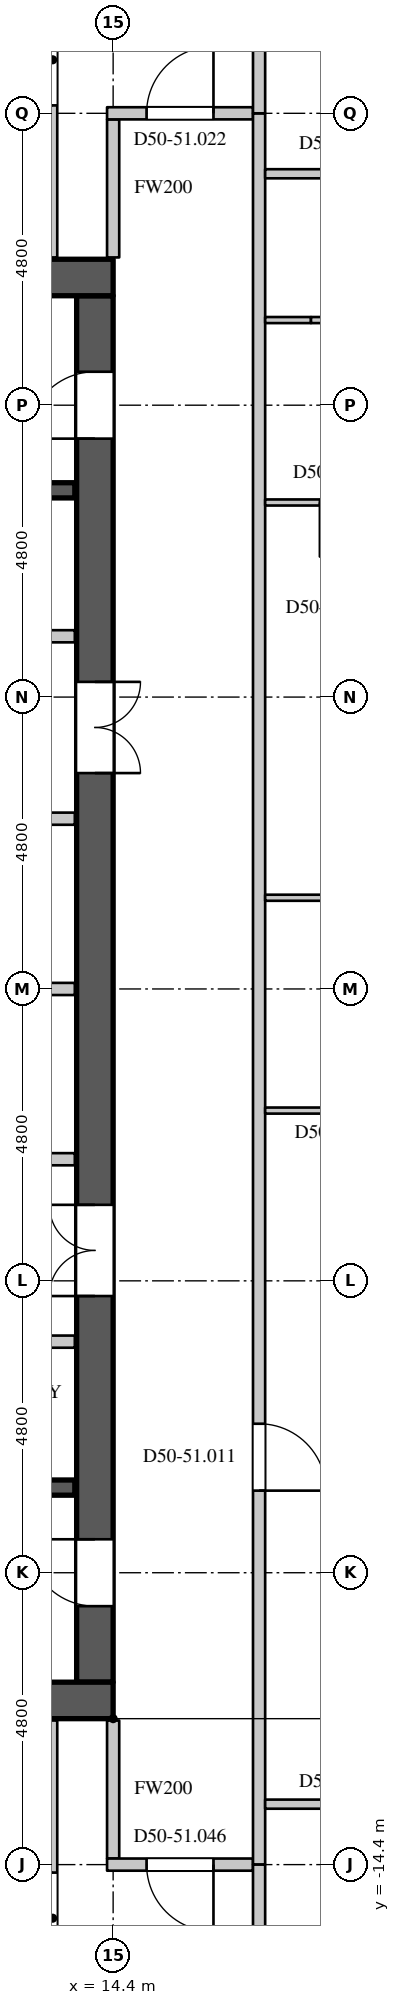
"""IFC4 building model, lengths in metres.
Left out: names, types, materials, properties, quantities, classifications, styles, units other than length and angle.
Written with IfcOpenShell. Run it as: python <this file> out.ifc"""

import sys

from ifc_helpers import new_model, si_unit, direction, frame, frame_2d, origin, place, context, subcontext, project, spatial, rectangle, extrude, element, fill, save


model = new_model("IFC4")
c1 = context("Model", 3, precision=1e-05, world=origin(), true_north=direction((0.0, 1.0)))
c2 = subcontext(c1, "Body", "Model", "MODEL_VIEW")
j1 = project(units=[si_unit("LENGTHUNIT", "METRE"), si_unit("PLANEANGLEUNIT", "RADIAN")], contexts=[c1])
p1 = place(None, origin())
s1 = spatial("IfcSite", under=j1, at=p1, CompositionType="ELEMENT")
p2 = place(p1, origin())
s2 = spatial("IfcBuilding", under=s1, at=p2, CompositionType="ELEMENT")
p3 = place(p2, frame((0.0, 0.0, 218.1)))
s3 = spatial("IfcBuildingStorey", under=s2, at=p3, CompositionType="ELEMENT", Elevation=218.1)
for number, where, z_axis, x_axis in (
    (1, (-14.4, 11.7, 0.0), (0.0, 0.0, 1.0), (1.0, 0.0, 0.0)),
    (2, (-14.4, -11.7, 0.0), (0.0, 0.0, 1.0), (1.0, 0.0, 0.0)),
):
    element("IfcWall", number, at=place(p3, frame(where, z_axis=z_axis, x_axis=x_axis)), inside=s3, PredefinedType="SHEAR", context=c2, shape_type="SweptSolid", body=[
        extrude(rectangle(XDim=28.8, YDim=0.6, at=frame_2d((14.4, 0.0))), origin(), (0.0, 0.0, 1.0), 4.2),
    ])
p4 = place(p3, frame((14.1, -11.4, 0.0), z_axis=(0.0, 0.0, 1.0), x_axis=(0.0, 1.0, 0.0)))
e3 = element("IfcWall", 3, at=p4, inside=s3, PredefinedType="SHEAR", context=c2, shape_type="SweptSolid", body=[
    extrude(rectangle(XDim=22.8, YDim=0.6, at=frame_2d((11.4, 0.0))), origin(), (0.0, 0.0, 1.0), 4.2),
])
p5 = place(p4, frame((20.45, 0.0, 0.0)))
e4 = element("IfcOpeningElement", 4, at=p5, cuts=e3, PredefinedType="OPENING", context=c2, shape_type="SweptSolid", body=[
    extrude(rectangle(XDim=1.1, YDim=2.2, at=frame_2d((0.55, 1.1))), frame((0.0, 0.31, 0.0), z_axis=(0.0, -1.0, 0.0), x_axis=(1.0, 0.0, 0.0)), (0.0, 0.0, 1.0), 0.62),
])
p6 = place(p4, frame((1.25, 0.0, 0.0)))
e5 = element("IfcOpeningElement", 5, at=p6, cuts=e3, PredefinedType="OPENING", context=c2, shape_type="SweptSolid", body=[
    extrude(rectangle(XDim=1.1, YDim=2.2, at=frame_2d((0.55, 1.1))), frame((0.0, 0.31, 0.0), z_axis=(0.0, -1.0, 0.0), x_axis=(1.0, 0.0, 0.0)), (0.0, 0.0, 1.0), 0.62),
])
p7 = place(p4, frame((14.95, 0.0, 0.0)))
e6 = element("IfcOpeningElement", 6, at=p7, cuts=e3, PredefinedType="OPENING", context=c2, shape_type="SweptSolid", body=[
    extrude(rectangle(XDim=1.5, YDim=2.4, at=frame_2d((0.75, 1.2))), frame((0.0, 0.31, 0.0), z_axis=(0.0, -1.0, 0.0), x_axis=(1.0, 0.0, 0.0)), (0.0, 0.0, 1.0), 0.62),
])
p8 = place(p4, frame((6.35, 0.0, 0.0)))
e7 = element("IfcOpeningElement", 7, at=p8, cuts=e3, PredefinedType="OPENING", context=c2, shape_type="SweptSolid", body=[
    extrude(rectangle(XDim=1.5, YDim=2.4, at=frame_2d((0.75, 1.2))), frame((0.0, 0.31, 0.0), z_axis=(0.0, -1.0, 0.0), x_axis=(1.0, 0.0, 0.0)), (0.0, 0.0, 1.0), 0.62),
])
p9 = place(p3, frame((-7.7, -5.8, 0.0), z_axis=(0.0, 0.0, 1.0), x_axis=(1.0, 0.0, 0.0)))
e8 = element("IfcWall", 8, at=p9, inside=s3, PredefinedType="PARTITIONING", context=c2, shape_type="SweptSolid", body=[
    extrude(rectangle(XDim=21.47, YDim=0.2, at=frame_2d((10.735, 0.0))), origin(), (0.0, 0.0, 1.0), 3.95),
])
p10 = place(p9, frame((1.75, 0.0, 0.0)))
e9 = element("IfcOpeningElement", 9, at=p10, cuts=e8, PredefinedType="OPENING", context=c2, shape_type="SweptSolid", body=[
    extrude(rectangle(XDim=0.9, YDim=2.2, at=frame_2d((0.45, 1.1))), frame((0.0, 0.11, 0.0), z_axis=(0.0, -1.0, 0.0), x_axis=(1.0, 0.0, 0.0)), (0.0, 0.0, 1.0), 0.22),
])
p11 = place(p9, frame((5.95, 0.0, 0.0)))
e10 = element("IfcOpeningElement", 10, at=p11, cuts=e8, PredefinedType="OPENING", context=c2, shape_type="SweptSolid", body=[
    extrude(rectangle(XDim=0.9, YDim=2.2, at=frame_2d((0.45, 1.1))), frame((0.0, 0.11, 0.0), z_axis=(0.0, -1.0, 0.0), x_axis=(1.0, 0.0, 0.0)), (0.0, 0.0, 1.0), 0.22),
])
p12 = place(p9, frame((10.35, 0.0, 0.0)))
e11 = element("IfcOpeningElement", 11, at=p12, cuts=e8, PredefinedType="OPENING", context=c2, shape_type="SweptSolid", body=[
    extrude(rectangle(XDim=0.9, YDim=2.2, at=frame_2d((0.45, 1.1))), frame((0.0, 0.11, 0.0), z_axis=(0.0, -1.0, 0.0), x_axis=(1.0, 0.0, 0.0)), (0.0, 0.0, 1.0), 0.22),
])
p13 = place(p9, frame((14.65, 0.0, 0.0)))
e12 = element("IfcOpeningElement", 12, at=p13, cuts=e8, PredefinedType="OPENING", context=c2, shape_type="SweptSolid", body=[
    extrude(rectangle(XDim=0.9, YDim=2.2, at=frame_2d((0.45, 1.1))), frame((0.0, 0.11, 0.0), z_axis=(0.0, -1.0, 0.0), x_axis=(1.0, 0.0, 0.0)), (0.0, 0.0, 1.0), 0.22),
])
p14 = place(p9, frame((18.75, 0.0, 0.0)))
e13 = element("IfcOpeningElement", 13, at=p14, cuts=e8, PredefinedType="OPENING", context=c2, shape_type="SweptSolid", body=[
    extrude(rectangle(XDim=0.9, YDim=2.2, at=frame_2d((0.45, 1.1))), frame((0.0, 0.11, 0.0), z_axis=(0.0, -1.0, 0.0), x_axis=(1.0, 0.0, 0.0)), (0.0, 0.0, 1.0), 0.22),
])
p15 = place(p3, frame((-7.7, 5.8, 0.0), z_axis=(0.0, 0.0, 1.0), x_axis=(1.0, 0.0, 0.0)))
e14 = element("IfcWall", 14, at=p15, inside=s3, PredefinedType="PARTITIONING", context=c2, shape_type="SweptSolid", body=[
    extrude(rectangle(XDim=21.47, YDim=0.2, at=frame_2d((10.735, 0.0))), origin(), (0.0, 0.0, 1.0), 3.95),
])
p16 = place(p15, frame((4.95, 0.0, 0.0)))
e15 = element("IfcOpeningElement", 15, at=p16, cuts=e14, PredefinedType="OPENING", context=c2, shape_type="SweptSolid", body=[
    extrude(rectangle(XDim=0.9, YDim=2.2, at=frame_2d((0.45, 1.1))), frame((0.0, 0.11, 0.0), z_axis=(0.0, -1.0, 0.0), x_axis=(1.0, 0.0, 0.0)), (0.0, 0.0, 1.0), 0.22),
])
p17 = place(p15, frame((15.55, 0.0, 0.0)))
e16 = element("IfcOpeningElement", 16, at=p17, cuts=e14, PredefinedType="OPENING", context=c2, shape_type="SweptSolid", body=[
    extrude(rectangle(XDim=0.9, YDim=2.2, at=frame_2d((0.45, 1.1))), frame((0.0, 0.11, 0.0), z_axis=(0.0, -1.0, 0.0), x_axis=(1.0, 0.0, 0.0)), (0.0, 0.0, 1.0), 0.22),
])
p18 = place(p3, frame((14.4, -14.3, 0.0), z_axis=(0.0, 0.0, 1.0), x_axis=(0.0, 1.0, 0.0)))
e17 = element("IfcWall", 17, at=p18, inside=s3, PredefinedType="PARTITIONING", context=c2, shape_type="SweptSolid", body=[
    extrude(rectangle(XDim=2.27, YDim=0.2, at=frame_2d((1.135, 0.0))), origin(), (0.0, 0.0, 1.0), 3.95),
])
p19 = place(p3, frame((14.3, -14.4, 0.0), z_axis=(0.0, 0.0, 1.0), x_axis=(1.0, 0.0, 0.0)))
e18 = element("IfcWall", 18, at=p19, inside=s3, PredefinedType="PARTITIONING", context=c2, shape_type="SweptSolid", body=[
    extrude(rectangle(XDim=2.4, YDim=0.2, at=frame_2d((1.2, 0.0))), origin(), (0.0, 0.0, 1.0), 3.95),
])
p20 = place(p19, frame((0.65, 0.0, 0.0)))
e19 = element("IfcOpeningElement", 19, at=p20, cuts=e18, PredefinedType="OPENING", context=c2, shape_type="SweptSolid", body=[
    extrude(rectangle(XDim=1.1, YDim=2.4, at=frame_2d((0.55, 1.2))), frame((0.0, 0.11, 0.0), z_axis=(0.0, -1.0, 0.0), x_axis=(1.0, 0.0, 0.0)), (0.0, 0.0, 1.0), 0.22),
])
p21 = place(p3, frame((14.4, 12.03, 0.0), z_axis=(0.0, 0.0, 1.0), x_axis=(0.0, 1.0, 0.0)))
e20 = element("IfcWall", 20, at=p21, inside=s3, PredefinedType="PARTITIONING", context=c2, shape_type="SweptSolid", body=[
    extrude(rectangle(XDim=2.27, YDim=0.2, at=frame_2d((1.135, 0.0))), origin(), (0.0, 0.0, 1.0), 3.95),
])
p22 = place(p3, frame((14.3, 14.4, 0.0), z_axis=(0.0, 0.0, 1.0), x_axis=(1.0, 0.0, 0.0)))
e21 = element("IfcWall", 21, at=p22, inside=s3, PredefinedType="PARTITIONING", context=c2, shape_type="SweptSolid", body=[
    extrude(rectangle(XDim=2.4, YDim=0.2, at=frame_2d((1.2, 0.0))), origin(), (0.0, 0.0, 1.0), 3.95),
])
p23 = place(p22, frame((0.65, 0.0, 0.0)))
e22 = element("IfcOpeningElement", 22, at=p23, cuts=e21, PredefinedType="OPENING", context=c2, shape_type="SweptSolid", body=[
    extrude(rectangle(XDim=1.1, YDim=2.4, at=frame_2d((0.55, 1.2))), frame((0.0, 0.11, 0.0), z_axis=(0.0, -1.0, 0.0), x_axis=(1.0, 0.0, 0.0)), (0.0, 0.0, 1.0), 0.22),
])
p24 = place(p3, frame((16.8, -14.4, 0.0), z_axis=(0.0, 0.0, 1.0), x_axis=(0.0, 1.0, 0.0)))
e23 = element("IfcWall", 23, at=p24, inside=s3, PredefinedType="PARTITIONING", context=c2, shape_type="SweptSolid", body=[
    extrude(rectangle(XDim=28.8, YDim=0.2, at=frame_2d((14.4, 0.0))), origin(), (0.0, 0.0, 1.0), 3.95),
])
p25 = place(p24, frame((6.15, 0.0, 0.0)))
e24 = element("IfcOpeningElement", 24, at=p25, cuts=e23, PredefinedType="OPENING", context=c2, shape_type="SweptSolid", body=[
    extrude(rectangle(XDim=1.1, YDim=2.4, at=frame_2d((0.55, 1.2))), frame((0.0, 0.11, 0.0), z_axis=(0.0, -1.0, 0.0), x_axis=(1.0, 0.0, 0.0)), (0.0, 0.0, 1.0), 0.22),
])
p26 = place(p3, frame((13.406, -25.731, 0.0), z_axis=(0.0, 0.0, 1.0), x_axis=(0.0, 1.0, 0.0)))
e25 = element("IfcWall", 25, at=p26, inside=s3, PredefinedType="PARTITIONING", context=c2, shape_type="SweptSolid", body=[
    extrude(rectangle(XDim=13.701, YDim=0.15, at=frame_2d((6.851, 0.0))), origin(), (0.0, 0.0, 1.0), 3.3),
])
p27 = place(p26, frame((9.7, 0.0, 0.0)))
e26 = element("IfcOpeningElement", 26, at=p27, cuts=e25, PredefinedType="OPENING", context=c2, shape_type="SweptSolid", body=[
    extrude(rectangle(XDim=1.5, YDim=2.2, at=frame_2d((0.75, 1.1))), frame((0.0, 0.085, 0.0), z_axis=(0.0, -1.0, 0.0), x_axis=(1.0, 0.0, 0.0)), (0.0, 0.0, 1.0), 0.17),
])
p28 = place(p3, frame((13.406, 12.03, 0.0), z_axis=(0.0, 0.0, 1.0), x_axis=(0.0, 1.0, 0.0)))
e27 = element("IfcWall", 27, at=p28, inside=s3, PredefinedType="PARTITIONING", context=c2, shape_type="SweptSolid", body=[
    extrude(rectangle(XDim=13.701, YDim=0.15, at=frame_2d((6.851, 0.0))), origin(), (0.0, 0.0, 1.0), 3.3),
])
p29 = place(p28, frame((2.5, 0.0, 0.0)))
e28 = element("IfcOpeningElement", 28, at=p29, cuts=e27, PredefinedType="OPENING", context=c2, shape_type="SweptSolid", body=[
    extrude(rectangle(XDim=1.5, YDim=2.2, at=frame_2d((0.75, 1.1))), frame((0.0, 0.085, 0.0), z_axis=(0.0, -1.0, 0.0), x_axis=(1.0, 0.0, 0.0)), (0.0, 0.0, 1.0), 0.17),
])
p30 = place(p3, frame((16.9, -13.406, 0.0), z_axis=(0.0, 0.0, 1.0), x_axis=(1.0, 0.0, 0.0)))
e29 = element("IfcWall", 29, at=p30, inside=s3, PredefinedType="PARTITIONING", context=c2, shape_type="SweptSolid", body=[
    extrude(rectangle(XDim=8.324, YDim=0.15, at=frame_2d((4.162, 0.0))), origin(), (0.0, 0.0, 1.0), 3.95),
])
p31 = place(p30, frame((1.2, 0.0, 0.0)))
e30 = element("IfcOpeningElement", 30, at=p31, cuts=e29, PredefinedType="OPENING", context=c2, shape_type="SweptSolid", body=[
    extrude(rectangle(XDim=0.95, YDim=2.2, at=frame_2d((0.475, 1.1))), frame((0.0, 0.085, 0.0), z_axis=(0.0, -1.0, 0.0), x_axis=(1.0, 0.0, 0.0)), (0.0, 0.0, 1.0), 0.17),
])
p32 = place(p3, frame((16.9, 13.406, 0.0), z_axis=(0.0, 0.0, 1.0), x_axis=(1.0, 0.0, 0.0)))
e31 = element("IfcWall", 31, at=p32, inside=s3, PredefinedType="PARTITIONING", context=c2, shape_type="SweptSolid", body=[
    extrude(rectangle(XDim=8.324, YDim=0.15, at=frame_2d((4.162, 0.0))), origin(), (0.0, 0.0, 1.0), 3.95),
])
p33 = place(p32, frame((5.0, 0.0, 0.0)))
e32 = element("IfcOpeningElement", 32, at=p33, cuts=e31, PredefinedType="OPENING", context=c2, shape_type="SweptSolid", body=[
    extrude(rectangle(XDim=1.5, YDim=2.2, at=frame_2d((0.75, 1.1))), frame((0.0, 0.085, 0.0), z_axis=(0.0, -1.0, 0.0), x_axis=(1.0, 0.0, 0.0)), (0.0, 0.0, 1.0), 0.17),
])
p34 = place(p32, frame((1.0, 0.0, 0.0)))
e33 = element("IfcOpeningElement", 33, at=p34, cuts=e31, PredefinedType="OPENING", context=c2, shape_type="SweptSolid", body=[
    extrude(rectangle(XDim=0.9, YDim=2.2, at=frame_2d((0.45, 1.1))), frame((0.0, 0.085, 0.0), z_axis=(0.0, -1.0, 0.0), x_axis=(1.0, 0.0, 0.0)), (0.0, 0.0, 1.0), 0.17),
])
for number, where, z_axis, x_axis in (
    (34, (16.8, -19.803, 0.0), (0.0, 0.0, 1.0), (0.0, 1.0, 0.0)),
    (35, (16.8, 14.4, 0.0), (0.0, 0.0, 1.0), (0.0, 1.0, 0.0)),
):
    element("IfcWall", number, at=place(p3, frame(where, z_axis=z_axis, x_axis=x_axis)), inside=s3, PredefinedType="PARTITIONING", context=c2, shape_type="SweptSolid", body=[
        extrude(rectangle(XDim=5.403, YDim=0.2, at=frame_2d((2.702, 0.0))), origin(), (0.0, 0.0, 1.0), 3.95),
    ])
p35 = place(p3, frame((7.8, -2.8, 0.0), z_axis=(0.0, 0.0, 1.0), x_axis=(1.0, 0.0, 0.0)))
e36 = element("IfcWall", 36, at=p35, inside=s3, PredefinedType="PARTITIONING", context=c2, shape_type="SweptSolid", body=[
    extrude(rectangle(XDim=5.97, YDim=0.2, at=frame_2d((2.985, 0.0))), origin(), (0.0, 0.0, 1.0), 3.95),
])
p36 = place(p35, frame((2.55, 0.0, 0.0)))
e37 = element("IfcOpeningElement", 37, at=p36, cuts=e36, PredefinedType="OPENING", context=c2, shape_type="SweptSolid", body=[
    extrude(rectangle(XDim=0.9, YDim=2.2, at=frame_2d((0.45, 1.1))), frame((0.0, 0.11, 0.0), z_axis=(0.0, -1.0, 0.0), x_axis=(1.0, 0.0, 0.0)), (0.0, 0.0, 1.0), 0.22),
])
p37 = place(p3, frame((7.8, 0.0, 0.0), z_axis=(0.0, 0.0, 1.0), x_axis=(1.0, 0.0, 0.0)))
e38 = element("IfcWall", 38, at=p37, inside=s3, PredefinedType="PARTITIONING", context=c2, shape_type="SweptSolid", body=[
    extrude(rectangle(XDim=5.97, YDim=0.2, at=frame_2d((2.985, 0.0))), origin(), (0.0, 0.0, 1.0), 3.95),
])
p38 = place(p3, frame((10.42, 2.8, 0.0), z_axis=(0.0, 0.0, 1.0), x_axis=(1.0, 0.0, 0.0)))
e39 = element("IfcWall", 39, at=p38, inside=s3, PredefinedType="PARTITIONING", context=c2, shape_type="SweptSolid", body=[
    extrude(rectangle(XDim=3.35, YDim=0.2, at=frame_2d((1.675, 0.0))), origin(), (0.0, 0.0, 1.0), 3.95),
])
p39 = place(p38, frame((1.35, 0.0, 0.0)))
e40 = element("IfcOpeningElement", 40, at=p39, cuts=e39, PredefinedType="OPENING", context=c2, shape_type="SweptSolid", body=[
    extrude(rectangle(XDim=0.6, YDim=2.0, at=frame_2d((0.3, 1.0))), frame((0.0, 0.11, 0.0), z_axis=(0.0, -1.0, 0.0), x_axis=(1.0, 0.0, 0.0)), (0.0, 0.0, 1.0), 0.22),
])
p40 = place(p3, frame((5.525, -8.2, 0.0), z_axis=(0.0, 0.0, 1.0), x_axis=(1.0, 0.0, 0.0)))
e41 = element("IfcWall", 41, at=p40, inside=s3, PredefinedType="SHEAR", context=c2, shape_type="SweptSolid", body=[
    extrude(rectangle(XDim=8.245, YDim=0.25, at=frame_2d((4.123, 0.0))), origin(), (0.0, 0.0, 1.0), 3.95),
])
p41 = place(p3, frame((5.275, 8.2, 0.0), z_axis=(0.0, 0.0, 1.0), x_axis=(1.0, 0.0, 0.0)))
e42 = element("IfcWall", 42, at=p41, inside=s3, PredefinedType="SHEAR", context=c2, shape_type="SweptSolid", body=[
    extrude(rectangle(XDim=8.495, YDim=0.25, at=frame_2d((4.248, 0.0))), origin(), (0.0, 0.0, 1.0), 3.95),
])
p42 = place(p3, frame((16.9, -2.0, 0.0), z_axis=(0.0, 0.0, 1.0), x_axis=(1.0, 0.0, 0.0)))
e43 = element("IfcWall", 43, at=p42, inside=s3, PredefinedType="PARTITIONING", context=c2, shape_type="SweptSolid", body=[
    extrude(rectangle(XDim=3.75, YDim=0.1, at=frame_2d((1.875, 0.0))), origin(), (0.0, 0.0, 1.0), 3.95),
])
p43 = place(p42, frame((1.45, 0.0, 0.0)))
e44 = element("IfcOpeningElement", 44, at=p43, cuts=e43, PredefinedType="OPENING", context=c2, shape_type="SweptSolid", body=[
    extrude(rectangle(XDim=0.9, YDim=2.2, at=frame_2d((0.45, 1.1))), frame((0.0, 0.06, 0.0), z_axis=(0.0, -1.0, 0.0), x_axis=(1.0, 0.0, 0.0)), (0.0, 0.0, 1.0), 0.12),
])
p44 = place(p3, frame((16.9, 1.5, 0.0), z_axis=(0.0, 0.0, 1.0), x_axis=(1.0, 0.0, 0.0)))
e45 = element("IfcWall", 45, at=p44, inside=s3, PredefinedType="PARTITIONING", context=c2, shape_type="SweptSolid", body=[
    extrude(rectangle(XDim=3.725, YDim=0.1, at=frame_2d((1.863, 0.0))), origin(), (0.0, 0.0, 1.0), 3.95),
])
p45 = place(p3, frame((16.9, 8.0, 0.0), z_axis=(0.0, 0.0, 1.0), x_axis=(1.0, 0.0, 0.0)))
e46 = element("IfcWall", 46, at=p45, inside=s3, PredefinedType="PARTITIONING", context=c2, shape_type="SweptSolid", body=[
    extrude(rectangle(XDim=2.775, YDim=0.1, at=frame_2d((1.388, 0.0))), origin(), (0.0, 0.0, 1.0), 3.95),
])
p46 = place(p45, frame((0.9, 0.0, 0.0)))
e47 = element("IfcOpeningElement", 47, at=p46, cuts=e46, PredefinedType="OPENING", context=c2, shape_type="SweptSolid", body=[
    extrude(rectangle(XDim=0.9, YDim=2.2, at=frame_2d((0.45, 1.1))), frame((0.0, 0.06, 0.0), z_axis=(0.0, -1.0, 0.0), x_axis=(1.0, 0.0, 0.0)), (0.0, 0.0, 1.0), 0.12),
])
p47 = place(p3, frame((16.9, 11.0, 0.0), z_axis=(0.0, 0.0, 1.0), x_axis=(1.0, 0.0, 0.0)))
e48 = element("IfcWall", 48, at=p47, inside=s3, PredefinedType="PARTITIONING", context=c2, shape_type="SweptSolid", body=[
    extrude(rectangle(XDim=0.754, YDim=0.1, at=frame_2d((0.377, 0.0))), origin(), (0.0, 0.0, 1.0), 3.35),
])
p48 = place(p3, frame((17.654, 11.0, 0.0), z_axis=(0.0, 0.0, 1.0), x_axis=(1.0, 0.0, 0.0)))
e49 = element("IfcWall", 49, at=p48, inside=s3, PredefinedType="PARTITIONING", context=c2, shape_type="SweptSolid", body=[
    extrude(rectangle(XDim=2.021, YDim=0.1, at=frame_2d((1.011, 0.0))), origin(), (0.0, 0.0, 1.0), 3.95),
])
p49 = place(p5, origin())
e50 = element("IfcDoor", 50, at=p49, inside=s3, OperationType="SINGLE_SWING_LEFT", PredefinedType="DOOR", context=c2, shape_type="SweptSolid", body=[
    extrude(rectangle(XDim=1.1, YDim=2.2, at=frame_2d((0.55, 1.1))), frame((0.0, 0.295, 0.0), z_axis=(0.0, -1.0, 0.0), x_axis=(1.0, 0.0, 0.0)), (0.0, 0.0, 1.0), 0.05),
])
fill(e4, e50)
p50 = place(p6, origin())
e51 = element("IfcDoor", 51, at=p50, inside=s3, OperationType="SINGLE_SWING_RIGHT", PredefinedType="DOOR", context=c2, shape_type="SweptSolid", body=[
    extrude(rectangle(XDim=1.1, YDim=2.2, at=frame_2d((0.55, 1.1))), frame((0.0, 0.295, 0.0), z_axis=(0.0, -1.0, 0.0), x_axis=(1.0, 0.0, 0.0)), (0.0, 0.0, 1.0), 0.05),
])
fill(e5, e51)
p51 = place(p7, origin())
e52 = element("IfcDoor", 52, at=p51, inside=s3, OperationType="DOUBLE_DOOR_SINGLE_SWING", PredefinedType="DOOR", context=c2, shape_type="SweptSolid", body=[
    extrude(rectangle(XDim=1.5, YDim=2.4, at=frame_2d((0.75, 1.2))), frame((0.0, -0.245, 0.0), z_axis=(0.0, -1.0, 0.0), x_axis=(1.0, 0.0, 0.0)), (0.0, 0.0, 1.0), 0.05),
])
fill(e6, e52)
p52 = place(p8, origin())
e53 = element("IfcDoor", 53, at=p52, inside=s3, OperationType="DOUBLE_DOOR_SINGLE_SWING", PredefinedType="DOOR", context=c2, shape_type="SweptSolid", body=[
    extrude(rectangle(XDim=1.5, YDim=2.4, at=frame_2d((0.75, 1.2))), frame((0.0, 0.295, 0.0), z_axis=(0.0, -1.0, 0.0), x_axis=(1.0, 0.0, 0.0)), (0.0, 0.0, 1.0), 0.05),
])
fill(e7, e53)
p53 = place(p25, origin())
e54 = element("IfcDoor", 54, at=p53, inside=s3, OperationType="SINGLE_SWING_RIGHT", PredefinedType="DOOR", context=c2, shape_type="SweptSolid", body=[
    extrude(rectangle(XDim=1.1, YDim=2.4, at=frame_2d((0.55, 1.2))), frame((0.0, 0.025, 0.0), z_axis=(0.0, -1.0, 0.0), x_axis=(1.0, 0.0, 0.0)), (0.0, 0.0, 1.0), 0.05),
])
fill(e24, e54)
p54 = place(p46, origin())
e55 = element("IfcDoor", 55, at=p54, inside=s3, OperationType="SINGLE_SWING_RIGHT", PredefinedType="DOOR", context=c2, shape_type="SweptSolid", body=[
    extrude(rectangle(XDim=0.9, YDim=2.2, at=frame_2d((0.45, 1.1))), frame((0.0, 0.025, 0.0), z_axis=(0.0, -1.0, 0.0), x_axis=(1.0, 0.0, 0.0)), (0.0, 0.0, 1.0), 0.05),
])
fill(e47, e55)
p55 = place(p23, origin())
e56 = element("IfcDoor", 56, at=p55, inside=s3, OperationType="SINGLE_SWING_RIGHT", PredefinedType="DOOR", context=c2, shape_type="SweptSolid", body=[
    extrude(rectangle(XDim=1.1, YDim=2.4, at=frame_2d((0.55, 1.2))), frame((0.0, 0.025, 0.0), z_axis=(0.0, -1.0, 0.0), x_axis=(1.0, 0.0, 0.0)), (0.0, 0.0, 1.0), 0.05),
])
fill(e22, e56)
p56 = place(p29, origin())
e57 = element("IfcDoor", 57, at=p56, inside=s3, OperationType="DOUBLE_DOOR_SINGLE_SWING", PredefinedType="DOOR", context=c2, shape_type="SweptSolid", body=[
    extrude(rectangle(XDim=1.5, YDim=2.2, at=frame_2d((0.75, 1.1))), frame((0.0, 0.025, 0.0), z_axis=(0.0, -1.0, 0.0), x_axis=(1.0, 0.0, 0.0)), (0.0, 0.0, 1.0), 0.05),
])
fill(e28, e57)
p57 = place(p20, origin())
e58 = element("IfcDoor", 58, at=p57, inside=s3, OperationType="SINGLE_SWING_LEFT", PredefinedType="DOOR", context=c2, shape_type="SweptSolid", body=[
    extrude(rectangle(XDim=1.1, YDim=2.4, at=frame_2d((0.55, 1.2))), frame((0.0, 0.025, 0.0), z_axis=(0.0, -1.0, 0.0), x_axis=(1.0, 0.0, 0.0)), (0.0, 0.0, 1.0), 0.05),
])
fill(e19, e58)
p58 = place(p27, origin())
e59 = element("IfcDoor", 59, at=p58, inside=s3, OperationType="DOUBLE_DOOR_SINGLE_SWING", PredefinedType="DOOR", context=c2, shape_type="SweptSolid", body=[
    extrude(rectangle(XDim=1.5, YDim=2.2, at=frame_2d((0.75, 1.1))), frame((0.0, 0.025, 0.0), z_axis=(0.0, -1.0, 0.0), x_axis=(1.0, 0.0, 0.0)), (0.0, 0.0, 1.0), 0.05),
])
fill(e26, e59)
save(model, sys.argv[1])
